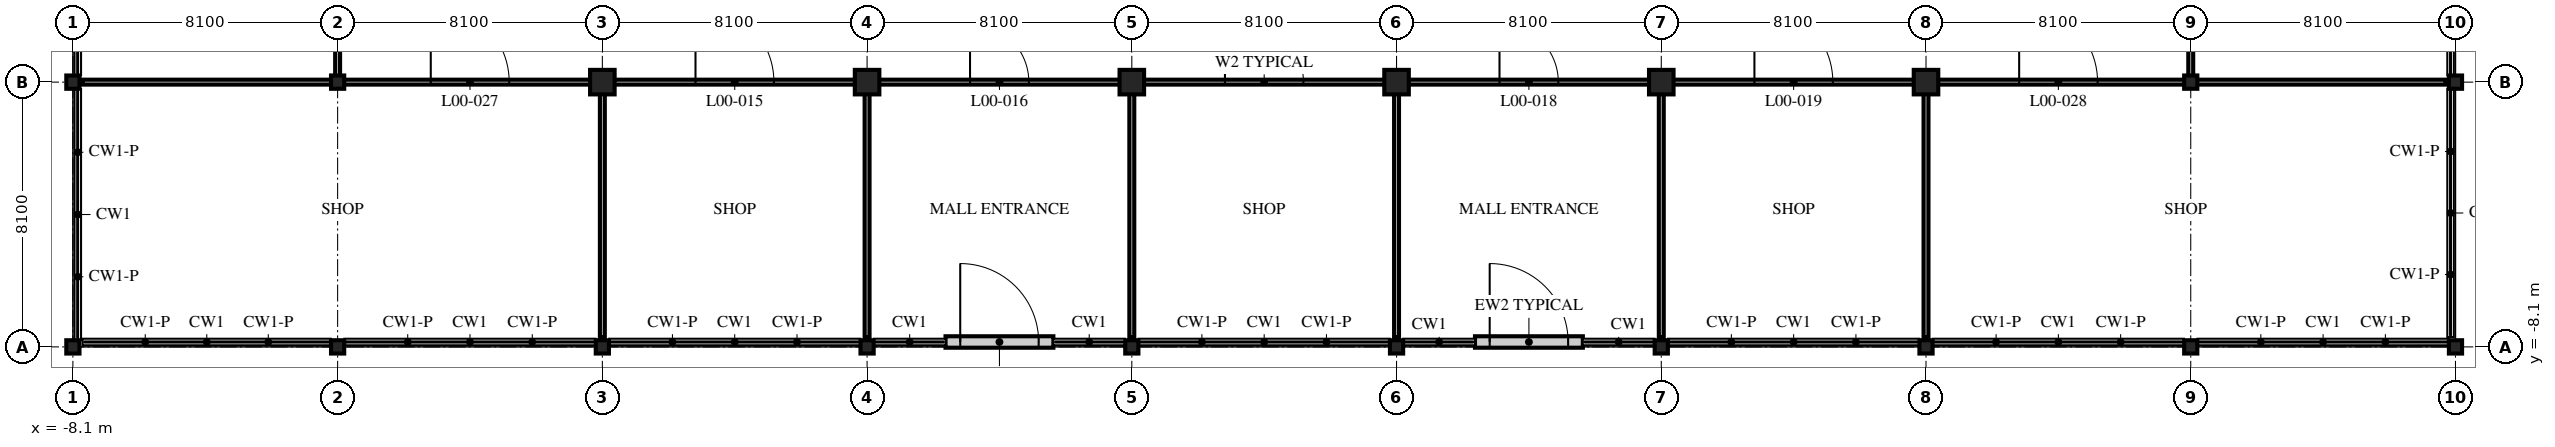
"""IFC4 building model, lengths in metres.
Left out: names, types, materials, properties, quantities, classifications, styles, units other than length and angle.
Written with IfcOpenShell. Run it as: python <this file> out.ifc"""

import sys

from ifc_helpers import new_model, si_unit, direction, frame, frame_2d, origin, origin_with_axes, origin_2d, place, context, subcontext, project, spatial, rectangle, hollow_rectangle, i_section, extrude, element, fill, save


model = new_model("IFC4")
c1 = context("Model", 3, precision=1e-05, world=origin(), true_north=direction((0.0, 1.0)))
c2 = subcontext(c1, "Body", "Model", "MODEL_VIEW")
j1 = project(units=[si_unit("LENGTHUNIT", "METRE"), si_unit("PLANEANGLEUNIT", "RADIAN")], contexts=[c1])
p1 = place(None, origin())
s1 = spatial("IfcSite", under=j1, at=p1, CompositionType="ELEMENT")
p2 = place(p1, origin())
s2 = spatial("IfcBuilding", under=s1, at=p2, CompositionType="ELEMENT")
p3 = place(p2, origin())
s3 = spatial("IfcBuildingStorey", under=s2, at=p3, CompositionType="ELEMENT", Elevation=0.0)
for number, where, z_axis, x_axis in (
    (1, (-8.1, -8.1, 0.0), (0.0, 0.0, 1.0), (1.0, 0.0, 0.0)),
    (2, (-8.1, 0.0, 0.0), (0.0, 0.0, 1.0), (1.0, 0.0, 0.0)),
    (3, (0.0, -8.1, 0.0), (0.0, 0.0, 1.0), (1.0, 0.0, 0.0)),
    (4, (0.0, 0.0, 0.0), (0.0, 0.0, 1.0), (1.0, 0.0, 0.0)),
    (5, (8.1, -8.1, 0.0), (0.0, 0.0, 1.0), (1.0, 0.0, 0.0)),
):
    element("IfcColumn", number, at=place(p3, frame(where, z_axis=z_axis, x_axis=x_axis)), inside=s3, PredefinedType="COLUMN", context=c2, shape_type="SweptSolid", body=[
        extrude(i_section(OverallWidth=0.403, OverallDepth=0.406, WebThickness=0.027, FlangeThickness=0.043, FilletRadius=0.015, at=origin_2d()), origin(), (0.0, 0.0, 1.0), 6.0),
    ])
p4 = place(p3, frame((8.1, 0.0, 0.0), z_axis=(0.0, 0.0, 1.0), x_axis=(1.0, 0.0, 0.0)))
e6 = element("IfcColumn", 6, at=p4, inside=s3, PredefinedType="COLUMN", context=c2, shape_type="SweptSolid", body=[
    extrude(hollow_rectangle(XDim=0.75, YDim=0.75, WallThickness=0.07, at=origin_2d()), origin(), (0.0, 0.0, 1.0), 6.0),
])
p5 = place(p3, frame((16.2, -8.1, 0.0), z_axis=(0.0, 0.0, 1.0), x_axis=(1.0, 0.0, 0.0)))
e7 = element("IfcColumn", 7, at=p5, inside=s3, PredefinedType="COLUMN", context=c2, shape_type="SweptSolid", body=[
    extrude(i_section(OverallWidth=0.403, OverallDepth=0.406, WebThickness=0.027, FlangeThickness=0.043, FilletRadius=0.015, at=origin_2d()), origin(), (0.0, 0.0, 1.0), 6.0),
])
p6 = place(p3, frame((16.2, 0.0, 0.0), z_axis=(0.0, 0.0, 1.0), x_axis=(1.0, 0.0, 0.0)))
e8 = element("IfcColumn", 8, at=p6, inside=s3, PredefinedType="COLUMN", context=c2, shape_type="SweptSolid", body=[
    extrude(hollow_rectangle(XDim=0.75, YDim=0.75, WallThickness=0.07, at=origin_2d()), origin(), (0.0, 0.0, 1.0), 6.0),
])
p7 = place(p3, frame((24.3, -8.1, 0.0), z_axis=(0.0, 0.0, 1.0), x_axis=(1.0, 0.0, 0.0)))
e9 = element("IfcColumn", 9, at=p7, inside=s3, PredefinedType="COLUMN", context=c2, shape_type="SweptSolid", body=[
    extrude(i_section(OverallWidth=0.403, OverallDepth=0.406, WebThickness=0.027, FlangeThickness=0.043, FilletRadius=0.015, at=origin_2d()), origin(), (0.0, 0.0, 1.0), 6.0),
])
p8 = place(p3, frame((24.3, 0.0, 0.0), z_axis=(0.0, 0.0, 1.0), x_axis=(1.0, 0.0, 0.0)))
e10 = element("IfcColumn", 10, at=p8, inside=s3, PredefinedType="COLUMN", context=c2, shape_type="SweptSolid", body=[
    extrude(hollow_rectangle(XDim=0.75, YDim=0.75, WallThickness=0.07, at=origin_2d()), origin(), (0.0, 0.0, 1.0), 6.0),
])
p9 = place(p3, frame((32.4, -8.1, 0.0), z_axis=(0.0, 0.0, 1.0), x_axis=(1.0, 0.0, 0.0)))
e11 = element("IfcColumn", 11, at=p9, inside=s3, PredefinedType="COLUMN", context=c2, shape_type="SweptSolid", body=[
    extrude(i_section(OverallWidth=0.403, OverallDepth=0.406, WebThickness=0.027, FlangeThickness=0.043, FilletRadius=0.015, at=origin_2d()), origin(), (0.0, 0.0, 1.0), 6.0),
])
p10 = place(p3, frame((32.4, 0.0, 0.0), z_axis=(0.0, 0.0, 1.0), x_axis=(1.0, 0.0, 0.0)))
e12 = element("IfcColumn", 12, at=p10, inside=s3, PredefinedType="COLUMN", context=c2, shape_type="SweptSolid", body=[
    extrude(hollow_rectangle(XDim=0.75, YDim=0.75, WallThickness=0.07, at=origin_2d()), origin(), (0.0, 0.0, 1.0), 6.0),
])
p11 = place(p3, frame((40.5, -8.1, 0.0), z_axis=(0.0, 0.0, 1.0), x_axis=(1.0, 0.0, 0.0)))
e13 = element("IfcColumn", 13, at=p11, inside=s3, PredefinedType="COLUMN", context=c2, shape_type="SweptSolid", body=[
    extrude(i_section(OverallWidth=0.403, OverallDepth=0.406, WebThickness=0.027, FlangeThickness=0.043, FilletRadius=0.015, at=origin_2d()), origin(), (0.0, 0.0, 1.0), 6.0),
])
p12 = place(p3, frame((40.5, 0.0, 0.0), z_axis=(0.0, 0.0, 1.0), x_axis=(1.0, 0.0, 0.0)))
e14 = element("IfcColumn", 14, at=p12, inside=s3, PredefinedType="COLUMN", context=c2, shape_type="SweptSolid", body=[
    extrude(hollow_rectangle(XDim=0.75, YDim=0.75, WallThickness=0.07, at=origin_2d()), origin(), (0.0, 0.0, 1.0), 6.0),
])
p13 = place(p3, frame((48.6, -8.1, 0.0), z_axis=(0.0, 0.0, 1.0), x_axis=(1.0, 0.0, 0.0)))
e15 = element("IfcColumn", 15, at=p13, inside=s3, PredefinedType="COLUMN", context=c2, shape_type="SweptSolid", body=[
    extrude(i_section(OverallWidth=0.403, OverallDepth=0.406, WebThickness=0.027, FlangeThickness=0.043, FilletRadius=0.015, at=origin_2d()), origin(), (0.0, 0.0, 1.0), 6.0),
])
p14 = place(p3, frame((48.6, 0.0, 0.0), z_axis=(0.0, 0.0, 1.0), x_axis=(1.0, 0.0, 0.0)))
e16 = element("IfcColumn", 16, at=p14, inside=s3, PredefinedType="COLUMN", context=c2, shape_type="SweptSolid", body=[
    extrude(hollow_rectangle(XDim=0.75, YDim=0.75, WallThickness=0.07, at=origin_2d()), origin(), (0.0, 0.0, 1.0), 6.0),
])
for number, where, z_axis, x_axis in (
    (17, (56.7, -8.1, 0.0), (0.0, 0.0, 1.0), (1.0, 0.0, 0.0)),
    (18, (56.7, 0.0, 0.0), (0.0, 0.0, 1.0), (1.0, 0.0, 0.0)),
    (19, (64.8, -8.1, 0.0), (0.0, 0.0, 1.0), (1.0, 0.0, 0.0)),
    (20, (64.8, 0.0, 0.0), (0.0, 0.0, 1.0), (1.0, 0.0, 0.0)),
):
    element("IfcColumn", number, at=place(p3, frame(where, z_axis=z_axis, x_axis=x_axis)), inside=s3, PredefinedType="COLUMN", context=c2, shape_type="SweptSolid", body=[
        extrude(i_section(OverallWidth=0.403, OverallDepth=0.406, WebThickness=0.027, FlangeThickness=0.043, FilletRadius=0.015, at=origin_2d()), origin(), (0.0, 0.0, 1.0), 6.0),
    ])
p15 = place(p3, frame((18.6, -7.95, 0.0), z_axis=(0.0, 0.0, 1.0), x_axis=(1.0, 0.0, 0.0)))
e21 = element("IfcWall", 21, at=p15, inside=s3, PredefinedType="SOLIDWALL", context=c2, shape_type="SweptSolid", body=[
    extrude(rectangle(XDim=3.3, YDim=0.35, at=frame_2d((1.65, 0.0))), origin(), (0.0, 0.0, 1.0), 5.75),
])
p16 = place(p15, frame((0.45, 0.0, 0.0)))
e22 = element("IfcOpeningElement", 22, at=p16, cuts=e21, PredefinedType="OPENING", context=c2, shape_type="SweptSolid", body=[
    extrude(rectangle(XDim=2.4, YDim=2.7, at=frame_2d((1.2, 1.35))), frame((0.0, 0.185, 0.0), z_axis=(0.0, -1.0, 0.0), x_axis=(1.0, 0.0, 0.0)), (0.0, 0.0, 1.0), 0.37),
])
p17 = place(p3, frame((34.8, -7.95, 0.0), z_axis=(0.0, 0.0, 1.0), x_axis=(1.0, 0.0, 0.0)))
e23 = element("IfcWall", 23, at=p17, inside=s3, PredefinedType="SOLIDWALL", context=c2, shape_type="SweptSolid", body=[
    extrude(rectangle(XDim=3.3, YDim=0.35, at=frame_2d((1.65, 0.0))), origin(), (0.0, 0.0, 1.0), 5.75),
])
p18 = place(p17, frame((0.45, 0.0, 0.0)))
e24 = element("IfcOpeningElement", 24, at=p18, cuts=e23, PredefinedType="OPENING", context=c2, shape_type="SweptSolid", body=[
    extrude(rectangle(XDim=2.4, YDim=2.7, at=frame_2d((1.2, 1.35))), frame((0.0, 0.185, 0.0), z_axis=(0.0, -1.0, 0.0), x_axis=(1.0, 0.0, 0.0)), (0.0, 0.0, 1.0), 0.37),
])
p19 = place(p3, origin_with_axes())
e25 = element("IfcWall", 25, at=p19, inside=s3, PredefinedType="PARTITIONING", context=c2, shape_type="SweptSolid", body=[
    extrude(rectangle(XDim=56.7, YDim=0.15, at=frame_2d((28.35, 0.0))), origin(), (0.0, 0.0, 1.0), 5.138),
])
p20 = place(p19, frame((10.95, 0.0, 0.0)))
e26 = element("IfcOpeningElement", 26, at=p20, cuts=e25, PredefinedType="OPENING", context=c2, shape_type="SweptSolid", body=[
    extrude(rectangle(XDim=2.4, YDim=2.7, at=frame_2d((1.2, 1.35))), frame((0.0, 0.085, 0.0), z_axis=(0.0, -1.0, 0.0), x_axis=(1.0, 0.0, 0.0)), (0.0, 0.0, 1.0), 0.17),
])
p21 = place(p19, frame((19.35, 0.0, 0.0)))
e27 = element("IfcOpeningElement", 27, at=p21, cuts=e25, PredefinedType="OPENING", context=c2, shape_type="SweptSolid", body=[
    extrude(rectangle(XDim=1.8, YDim=2.4, at=frame_2d((0.9, 1.2))), frame((0.0, 0.085, 0.0), z_axis=(0.0, -1.0, 0.0), x_axis=(1.0, 0.0, 0.0)), (0.0, 0.0, 1.0), 0.17),
])
p22 = place(p19, frame((27.15, 0.0, 0.0)))
e28 = element("IfcOpeningElement", 28, at=p22, cuts=e25, PredefinedType="OPENING", context=c2, shape_type="SweptSolid", body=[
    extrude(rectangle(XDim=2.4, YDim=2.7, at=frame_2d((1.2, 1.35))), frame((0.0, 0.085, 0.0), z_axis=(0.0, -1.0, 0.0), x_axis=(1.0, 0.0, 0.0)), (0.0, 0.0, 1.0), 0.17),
])
p23 = place(p19, frame((35.55, 0.0, 0.0)))
e29 = element("IfcOpeningElement", 29, at=p23, cuts=e25, PredefinedType="OPENING", context=c2, shape_type="SweptSolid", body=[
    extrude(rectangle(XDim=1.8, YDim=2.4, at=frame_2d((0.9, 1.2))), frame((0.0, 0.085, 0.0), z_axis=(0.0, -1.0, 0.0), x_axis=(1.0, 0.0, 0.0)), (0.0, 0.0, 1.0), 0.17),
])
p24 = place(p19, frame((43.35, 0.0, 0.0)))
e30 = element("IfcOpeningElement", 30, at=p24, cuts=e25, PredefinedType="OPENING", context=c2, shape_type="SweptSolid", body=[
    extrude(rectangle(XDim=2.4, YDim=2.7, at=frame_2d((1.2, 1.35))), frame((0.0, 0.085, 0.0), z_axis=(0.0, -1.0, 0.0), x_axis=(1.0, 0.0, 0.0)), (0.0, 0.0, 1.0), 0.17),
])
p25 = place(p19, frame((2.85, 0.0, 0.0)))
e31 = element("IfcOpeningElement", 31, at=p25, cuts=e25, PredefinedType="OPENING", context=c2, shape_type="SweptSolid", body=[
    extrude(rectangle(XDim=2.4, YDim=2.7, at=frame_2d((1.2, 1.35))), frame((0.0, 0.085, 0.0), z_axis=(0.0, -1.0, 0.0), x_axis=(1.0, 0.0, 0.0)), (0.0, 0.0, 1.0), 0.17),
])
p26 = place(p19, frame((51.45, 0.0, 0.0)))
e32 = element("IfcOpeningElement", 32, at=p26, cuts=e25, PredefinedType="OPENING", context=c2, shape_type="SweptSolid", body=[
    extrude(rectangle(XDim=2.4, YDim=2.7, at=frame_2d((1.2, 1.35))), frame((0.0, 0.085, 0.0), z_axis=(0.0, -1.0, 0.0), x_axis=(1.0, 0.0, 0.0)), (0.0, 0.0, 1.0), 0.17),
])
p27 = place(p3, frame((0.0, 0.0, 0.0), z_axis=(0.0, 0.0, 1.0), x_axis=(0.0, 1.0, 0.0)))
e33 = element("IfcWall", 33, at=p27, inside=s3, PredefinedType="PARTITIONING", context=c2, shape_type="SweptSolid", body=[
    extrude(rectangle(XDim=44.1, YDim=0.15, at=frame_2d((22.05, 0.0))), origin(), (0.0, 0.0, 1.0), 5.138),
])
p28 = place(p27, frame((3.15, 0.0, 0.0)))
e34 = element("IfcOpeningElement", 34, at=p28, cuts=e33, PredefinedType="OPENING", context=c2, shape_type="SweptSolid", body=[
    extrude(rectangle(XDim=1.8, YDim=2.4, at=frame_2d((0.9, 1.2))), frame((0.0, 0.085, 0.0), z_axis=(0.0, -1.0, 0.0), x_axis=(1.0, 0.0, 0.0)), (0.0, 0.0, 1.0), 0.17),
])
p29 = place(p27, frame((17.05, 0.0, 0.0)))
e35 = element("IfcOpeningElement", 35, at=p29, cuts=e33, PredefinedType="OPENING", context=c2, shape_type="SweptSolid", body=[
    extrude(rectangle(XDim=1.8, YDim=2.4, at=frame_2d((0.9, 1.2))), frame((0.0, 0.085, 0.0), z_axis=(0.0, -1.0, 0.0), x_axis=(1.0, 0.0, 0.0)), (0.0, 0.0, 1.0), 0.17),
])
p30 = place(p27, frame((27.45, 0.0, 0.0)))
e36 = element("IfcOpeningElement", 36, at=p30, cuts=e33, PredefinedType="OPENING", context=c2, shape_type="SweptSolid", body=[
    extrude(rectangle(XDim=1.8, YDim=2.4, at=frame_2d((0.9, 1.2))), frame((0.0, 0.085, 0.0), z_axis=(0.0, -1.0, 0.0), x_axis=(1.0, 0.0, 0.0)), (0.0, 0.0, 1.0), 0.17),
])
p31 = place(p27, frame((37.575, 0.0, 0.0)))
e37 = element("IfcOpeningElement", 37, at=p31, cuts=e33, PredefinedType="OPENING", context=c2, shape_type="SweptSolid", body=[
    extrude(rectangle(XDim=1.8, YDim=2.4, at=frame_2d((0.9, 1.2))), frame((0.0, 0.085, 0.0), z_axis=(0.0, -1.0, 0.0), x_axis=(1.0, 0.0, 0.0)), (0.0, 0.0, 1.0), 0.17),
])
p32 = place(p3, frame((56.7, 0.0, 0.0), z_axis=(0.0, 0.0, 1.0), x_axis=(0.0, 1.0, 0.0)))
e38 = element("IfcWall", 38, at=p32, inside=s3, PredefinedType="PARTITIONING", context=c2, shape_type="SweptSolid", body=[
    extrude(rectangle(XDim=44.1, YDim=0.15, at=frame_2d((22.05, 0.0))), origin(), (0.0, 0.0, 1.0), 5.138),
])
for number, where, z_axis, x_axis in (
    (39, (16.2, 0.0, 0.0), (0.0, 0.0, 1.0), (0.0, -1.0, 0.0)),
    (40, (24.3, 0.0, 0.0), (0.0, 0.0, 1.0), (0.0, -1.0, 0.0)),
    (41, (32.4, 0.0, 0.0), (0.0, 0.0, 1.0), (0.0, -1.0, 0.0)),
    (42, (40.5, 0.0, 0.0), (0.0, 0.0, 1.0), (0.0, -1.0, 0.0)),
    (43, (-7.8, 0.0, 0.0), (0.0, 0.0, 1.0), (1.0, 0.0, 0.0)),
    (44, (8.1, 0.0, 0.0), (0.0, 0.0, 1.0), (0.0, -1.0, 0.0)),
    (45, (56.7, 0.0, 0.0), (0.0, 0.0, 1.0), (1.0, 0.0, 0.0)),
    (46, (48.6, 0.0, 0.0), (0.0, 0.0, 1.0), (0.0, -1.0, 0.0)),
):
    element("IfcWall", number, at=place(p3, frame(where, z_axis=z_axis, x_axis=x_axis)), inside=s3, PredefinedType="PARTITIONING", context=c2, shape_type="SweptSolid", body=[
        extrude(rectangle(XDim=7.8, YDim=0.15, at=frame_2d((3.9, 0.0))), origin(), (0.0, 0.0, 1.0), 5.138),
    ])
p33 = place(p16, origin())
e47 = element("IfcDoor", 47, at=p33, inside=s3, OperationType="DOUBLE_DOOR_SINGLE_SWING", PredefinedType="DOOR", context=c2, shape_type="SweptSolid", body=[
    extrude(rectangle(XDim=2.4, YDim=2.7, at=frame_2d((1.2, 1.35))), frame((0.0, 0.025, 0.0), z_axis=(0.0, -1.0, 0.0), x_axis=(1.0, 0.0, 0.0)), (0.0, 0.0, 1.0), 0.05),
])
fill(e22, e47)
p34 = place(p18, origin())
e48 = element("IfcDoor", 48, at=p34, inside=s3, OperationType="DOUBLE_DOOR_SINGLE_SWING", PredefinedType="DOOR", context=c2, shape_type="SweptSolid", body=[
    extrude(rectangle(XDim=2.4, YDim=2.7, at=frame_2d((1.2, 1.35))), frame((0.0, 0.025, 0.0), z_axis=(0.0, -1.0, 0.0), x_axis=(1.0, 0.0, 0.0)), (0.0, 0.0, 1.0), 0.05),
])
fill(e24, e48)
p35 = place(p20, origin())
e49 = element("IfcDoor", 49, at=p35, inside=s3, OperationType="DOUBLE_DOOR_SINGLE_SWING", PredefinedType="DOOR", context=c2, shape_type="SweptSolid", body=[
    extrude(rectangle(XDim=2.4, YDim=2.7, at=frame_2d((1.2, 1.35))), frame((0.0, 0.025, 0.0), z_axis=(0.0, -1.0, 0.0), x_axis=(1.0, 0.0, 0.0)), (0.0, 0.0, 1.0), 0.05),
])
fill(e26, e49)
p36 = place(p21, origin())
e50 = element("IfcDoor", 50, at=p36, inside=s3, OperationType="DOUBLE_DOOR_SINGLE_SWING", PredefinedType="DOOR", context=c2, shape_type="SweptSolid", body=[
    extrude(rectangle(XDim=1.8, YDim=2.4, at=frame_2d((0.9, 1.2))), frame((0.0, 0.025, 0.0), z_axis=(0.0, -1.0, 0.0), x_axis=(1.0, 0.0, 0.0)), (0.0, 0.0, 1.0), 0.05),
])
fill(e27, e50)
p37 = place(p22, origin())
e51 = element("IfcDoor", 51, at=p37, inside=s3, OperationType="DOUBLE_DOOR_SINGLE_SWING", PredefinedType="DOOR", context=c2, shape_type="SweptSolid", body=[
    extrude(rectangle(XDim=2.4, YDim=2.7, at=frame_2d((1.2, 1.35))), frame((0.0, 0.025, 0.0), z_axis=(0.0, -1.0, 0.0), x_axis=(1.0, 0.0, 0.0)), (0.0, 0.0, 1.0), 0.05),
])
fill(e28, e51)
p38 = place(p23, origin())
e52 = element("IfcDoor", 52, at=p38, inside=s3, OperationType="DOUBLE_DOOR_SINGLE_SWING", PredefinedType="DOOR", context=c2, shape_type="SweptSolid", body=[
    extrude(rectangle(XDim=1.8, YDim=2.4, at=frame_2d((0.9, 1.2))), frame((0.0, 0.025, 0.0), z_axis=(0.0, -1.0, 0.0), x_axis=(1.0, 0.0, 0.0)), (0.0, 0.0, 1.0), 0.05),
])
fill(e29, e52)
p39 = place(p24, origin())
e53 = element("IfcDoor", 53, at=p39, inside=s3, OperationType="DOUBLE_DOOR_SINGLE_SWING", PredefinedType="DOOR", context=c2, shape_type="SweptSolid", body=[
    extrude(rectangle(XDim=2.4, YDim=2.7, at=frame_2d((1.2, 1.35))), frame((0.0, 0.025, 0.0), z_axis=(0.0, -1.0, 0.0), x_axis=(1.0, 0.0, 0.0)), (0.0, 0.0, 1.0), 0.05),
])
fill(e30, e53)
p40 = place(p25, origin())
e54 = element("IfcDoor", 54, at=p40, inside=s3, OperationType="DOUBLE_DOOR_SINGLE_SWING", PredefinedType="DOOR", context=c2, shape_type="SweptSolid", body=[
    extrude(rectangle(XDim=2.4, YDim=2.7, at=frame_2d((1.2, 1.35))), frame((0.0, 0.025, 0.0), z_axis=(0.0, -1.0, 0.0), x_axis=(1.0, 0.0, 0.0)), (0.0, 0.0, 1.0), 0.05),
])
fill(e31, e54)
p41 = place(p26, origin())
e55 = element("IfcDoor", 55, at=p41, inside=s3, OperationType="DOUBLE_DOOR_SINGLE_SWING", PredefinedType="DOOR", context=c2, shape_type="SweptSolid", body=[
    extrude(rectangle(XDim=2.4, YDim=2.7, at=frame_2d((1.2, 1.35))), frame((0.0, 0.025, 0.0), z_axis=(0.0, -1.0, 0.0), x_axis=(1.0, 0.0, 0.0)), (0.0, 0.0, 1.0), 0.05),
])
fill(e32, e55)
save(model, sys.argv[1])
